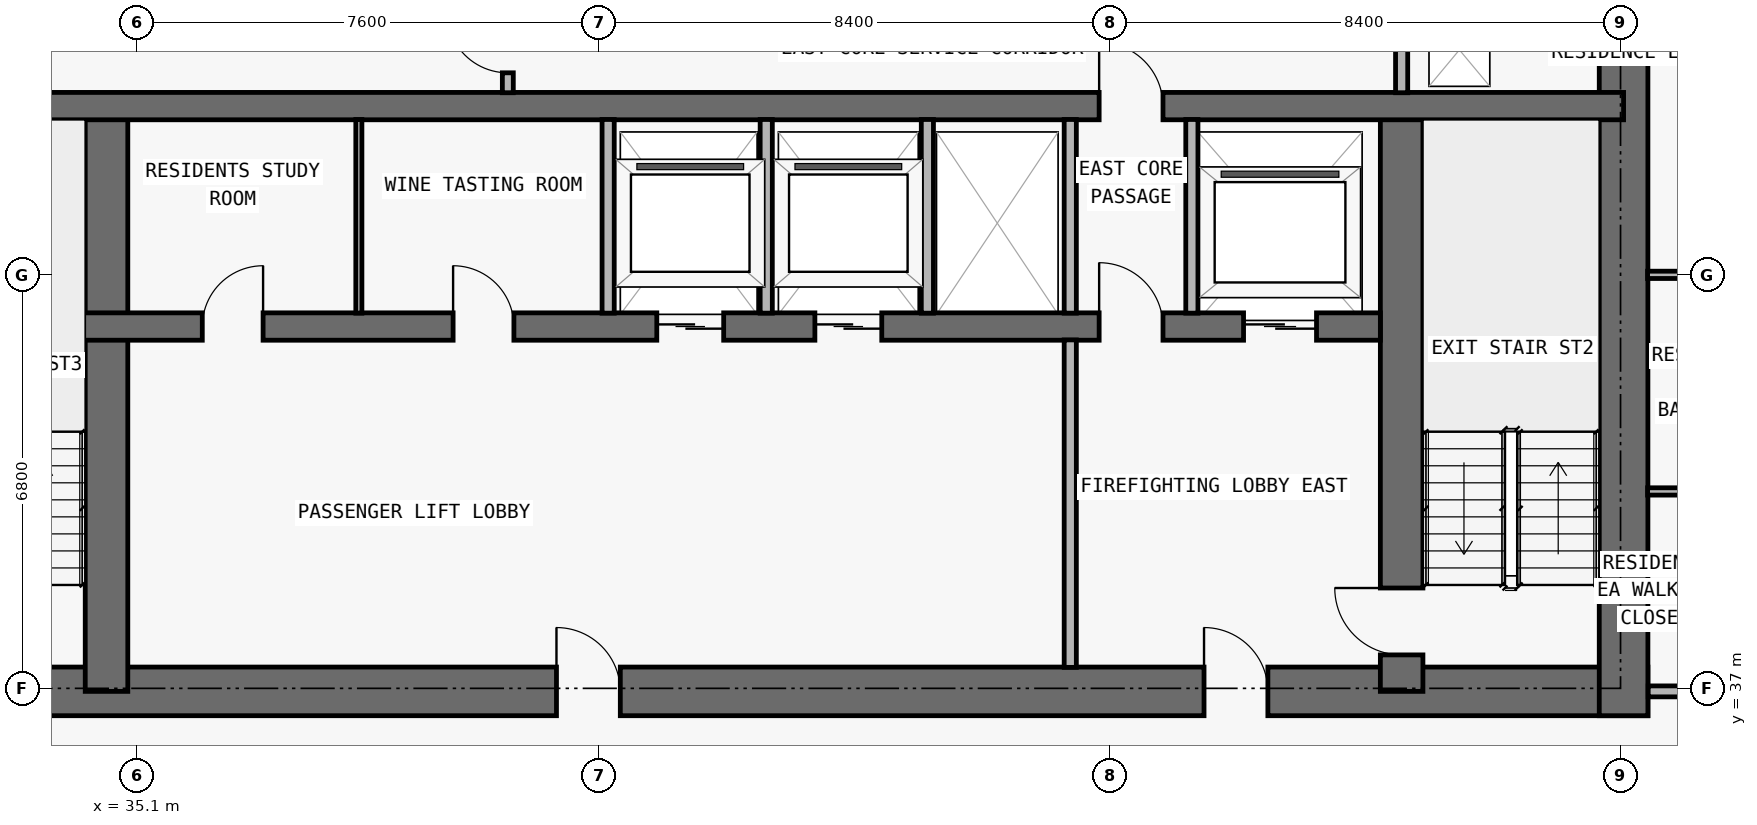
"""IFC4 building model, lengths in metres.
Left out: names, types, materials, properties, quantities, classifications, styles, units other than length and angle.
Written with IfcOpenShell. Run it as: python <this file> out.ifc"""

import sys

from ifc_helpers import new_model, si_unit, direction, frame, frame_2d, origin, place, context, subcontext, project, spatial, rectangle, extrude, element, fill, save


model = new_model("IFC4")
c1 = context("Model", 3, precision=1e-05, world=origin(), true_north=direction((0.0, 1.0)))
c2 = subcontext(c1, "Body", "Model", "MODEL_VIEW")
j1 = project(units=[si_unit("LENGTHUNIT", "METRE"), si_unit("PLANEANGLEUNIT", "RADIAN")], contexts=[c1])
p1 = place(None, origin())
s1 = spatial("IfcSite", under=j1, at=p1, CompositionType="ELEMENT")
p2 = place(p1, origin())
s2 = spatial("IfcBuilding", under=s1, at=p2, CompositionType="ELEMENT")
p3 = place(p2, frame((0.0, 0.0, 122.4)))
s3 = spatial("IfcBuildingStorey", under=s2, at=p3, CompositionType="ELEMENT", Elevation=122.4)
p4 = place(p3, frame((17.85, 36.95, 0.0), z_axis=(0.0, 0.0, 1.0), x_axis=(1.0, 0.0, 0.0)))
e1 = element("IfcWall", 1, at=p4, inside=s3, PredefinedType="SHEAR", context=c2, shape_type="SweptSolid", body=[
    extrude(rectangle(XDim=42.1, YDim=0.8, at=frame_2d((21.05, 0.0))), origin(), (0.0, 0.0, 1.0), 3.05),
])
p5 = place(p4, frame((14.45, 0.0, 0.0)))
e2 = element("IfcOpeningElement", 2, at=p5, cuts=e1, PredefinedType="OPENING", context=c2, shape_type="SweptSolid", body=[
    extrude(rectangle(XDim=1.1, YDim=2.15, at=frame_2d((0.55, 1.075))), frame((0.0, 0.41, 0.0), z_axis=(0.0, -1.0, 0.0), x_axis=(1.0, 0.0, 0.0)), (0.0, 0.0, 1.0), 0.82),
])
p6 = place(p4, frame((6.3, 0.0, 0.0)))
e3 = element("IfcOpeningElement", 3, at=p6, cuts=e1, PredefinedType="OPENING", context=c2, shape_type="SweptSolid", body=[
    extrude(rectangle(XDim=1.05, YDim=2.15, at=frame_2d((0.525, 1.075))), frame((0.0, 0.41, 0.0), z_axis=(0.0, -1.0, 0.0), x_axis=(1.0, 0.0, 0.0)), (0.0, 0.0, 1.0), 0.82),
])
p7 = place(p4, frame((34.8, 0.0, 0.0)))
e4 = element("IfcOpeningElement", 4, at=p7, cuts=e1, PredefinedType="OPENING", context=c2, shape_type="SweptSolid", body=[
    extrude(rectangle(XDim=1.05, YDim=2.15, at=frame_2d((0.525, 1.075))), frame((0.0, 0.41, 0.0), z_axis=(0.0, -1.0, 0.0), x_axis=(1.0, 0.0, 0.0)), (0.0, 0.0, 1.0), 0.82),
])
p8 = place(p4, frame((10.913, 0.0, 0.0)))
e5 = element("IfcOpeningElement", 5, at=p8, cuts=e1, PredefinedType="OPENING", context=c2, shape_type="SweptSolid", body=[
    extrude(rectangle(XDim=1.05, YDim=2.15, at=frame_2d((0.525, 1.075))), frame((0.0, 0.41, 0.0), z_axis=(0.0, -1.0, 0.0), x_axis=(1.0, 0.0, 0.0)), (0.0, 0.0, 1.0), 0.82),
])
p9 = place(p4, frame((24.15, 0.0, 0.0)))
e6 = element("IfcOpeningElement", 6, at=p9, cuts=e1, PredefinedType="OPENING", context=c2, shape_type="SweptSolid", body=[
    extrude(rectangle(XDim=1.05, YDim=2.15, at=frame_2d((0.525, 1.075))), frame((0.0, 0.41, 0.0), z_axis=(0.0, -1.0, 0.0), x_axis=(1.0, 0.0, 0.0)), (0.0, 0.0, 1.0), 0.82),
])
p10 = place(p3, frame((59.55, 36.55, 0.0), z_axis=(0.0, 0.0, 1.0), x_axis=(0.0, 1.0, 0.0)))
e7 = element("IfcWall", 7, at=p10, inside=s3, PredefinedType="SHEAR", context=c2, shape_type="SweptSolid", body=[
    extrude(rectangle(XDim=14.05, YDim=0.8, at=frame_2d((7.025, 0.0))), origin(), (0.0, 0.0, 1.0), 3.05),
])
p11 = place(p3, frame((55.9, 36.95, 0.0), z_axis=(0.0, 0.0, 1.0), x_axis=(0.0, 1.0, 0.0)))
e8 = element("IfcWall", 8, at=p11, inside=s3, PredefinedType="SHEAR", context=c2, shape_type="SweptSolid", body=[
    extrude(rectangle(XDim=9.625, YDim=0.7, at=frame_2d((4.812, 0.0))), origin(), (0.0, 0.0, 1.0), 3.05),
])
p12 = place(p11, frame((0.6, 0.0, 0.0)))
e9 = element("IfcOpeningElement", 9, at=p12, cuts=e8, PredefinedType="OPENING", context=c2, shape_type="SweptSolid", body=[
    extrude(rectangle(XDim=1.1, YDim=2.15, at=frame_2d((0.55, 1.075))), frame((0.0, 0.36, 0.0), z_axis=(0.0, -1.0, 0.0), x_axis=(1.0, 0.0, 0.0)), (0.0, 0.0, 1.0), 0.72),
])
p13 = place(p3, frame((34.6, 36.95, 0.0), z_axis=(0.0, 0.0, 1.0), x_axis=(0.0, 1.0, 0.0)))
e10 = element("IfcWall", 10, at=p13, inside=s3, PredefinedType="SHEAR", context=c2, shape_type="SweptSolid", body=[
    extrude(rectangle(XDim=9.625, YDim=0.7, at=frame_2d((4.812, 0.0))), origin(), (0.0, 0.0, 1.0), 3.05),
])
p14 = place(p3, frame((22.25, 42.95, 0.0), z_axis=(0.0, 0.0, 1.0), x_axis=(1.0, 0.0, 0.0)))
e11 = element("IfcWall", 11, at=p14, inside=s3, PredefinedType="SHEAR", context=c2, shape_type="SweptSolid", body=[
    extrude(rectangle(XDim=33.3, YDim=0.45, at=frame_2d((16.65, 0.0))), origin(), (0.0, 0.0, 1.0), 3.05),
])
p15 = place(p14, frame((1.05, 0.0, 0.0)))
e12 = element("IfcOpeningElement", 12, at=p15, cuts=e11, PredefinedType="OPENING", context=c2, shape_type="SweptSolid", body=[
    extrude(rectangle(XDim=1.2, YDim=2.2, at=frame_2d((0.6, 1.1))), frame((0.0, 0.235, 0.0), z_axis=(0.0, -1.0, 0.0), x_axis=(1.0, 0.0, 0.0)), (0.0, 0.0, 1.0), 0.47),
])
p16 = place(p14, frame((31.05, 0.0, 0.0)))
e13 = element("IfcOpeningElement", 13, at=p16, cuts=e11, PredefinedType="OPENING", context=c2, shape_type="SweptSolid", body=[
    extrude(rectangle(XDim=1.2, YDim=2.2, at=frame_2d((0.6, 1.1))), frame((0.0, 0.235, 0.0), z_axis=(0.0, -1.0, 0.0), x_axis=(1.0, 0.0, 0.0)), (0.0, 0.0, 1.0), 0.47),
])
p17 = place(p14, frame((21.4, 0.0, 0.0)))
e14 = element("IfcOpeningElement", 14, at=p17, cuts=e11, PredefinedType="OPENING", context=c2, shape_type="SweptSolid", body=[
    extrude(rectangle(XDim=1.1, YDim=2.2, at=frame_2d((0.55, 1.1))), frame((0.0, 0.235, 0.0), z_axis=(0.0, -1.0, 0.0), x_axis=(1.0, 0.0, 0.0)), (0.0, 0.0, 1.0), 0.47),
])
p18 = place(p14, frame((24.0, 0.0, 0.0)))
e15 = element("IfcOpeningElement", 15, at=p18, cuts=e11, PredefinedType="OPENING", context=c2, shape_type="SweptSolid", body=[
    extrude(rectangle(XDim=1.1, YDim=2.2, at=frame_2d((0.55, 1.1))), frame((0.0, 0.235, 0.0), z_axis=(0.0, -1.0, 0.0), x_axis=(1.0, 0.0, 0.0)), (0.0, 0.0, 1.0), 0.47),
])
p19 = place(p14, frame((3.625, 0.0, 0.0)))
e16 = element("IfcOpeningElement", 16, at=p19, cuts=e11, PredefinedType="OPENING", context=c2, shape_type="SweptSolid", body=[
    extrude(rectangle(XDim=1.05, YDim=2.15, at=frame_2d((0.525, 1.075))), frame((0.0, 0.235, 0.0), z_axis=(0.0, -1.0, 0.0), x_axis=(1.0, 0.0, 0.0)), (0.0, 0.0, 1.0), 0.47),
])
p20 = place(p14, frame((28.675, 0.0, 0.0)))
e17 = element("IfcOpeningElement", 17, at=p20, cuts=e11, PredefinedType="OPENING", context=c2, shape_type="SweptSolid", body=[
    extrude(rectangle(XDim=1.05, YDim=2.15, at=frame_2d((0.525, 1.075))), frame((0.0, 0.235, 0.0), z_axis=(0.0, -1.0, 0.0), x_axis=(1.0, 0.0, 0.0)), (0.0, 0.0, 1.0), 0.47),
])
p21 = place(p14, frame((13.925, 0.0, 0.0)))
e18 = element("IfcOpeningElement", 18, at=p21, cuts=e11, PredefinedType="OPENING", context=c2, shape_type="SweptSolid", body=[
    extrude(rectangle(XDim=1.0, YDim=2.2, at=frame_2d((0.5, 1.1))), frame((0.0, 0.235, 0.0), z_axis=(0.0, -1.0, 0.0), x_axis=(1.0, 0.0, 0.0)), (0.0, 0.0, 1.0), 0.47),
])
p22 = place(p14, frame((18.05, 0.0, 0.0)))
e19 = element("IfcOpeningElement", 19, at=p22, cuts=e11, PredefinedType="OPENING", context=c2, shape_type="SweptSolid", body=[
    extrude(rectangle(XDim=1.0, YDim=2.2, at=frame_2d((0.5, 1.1))), frame((0.0, 0.235, 0.0), z_axis=(0.0, -1.0, 0.0), x_axis=(1.0, 0.0, 0.0)), (0.0, 0.0, 1.0), 0.47),
])
p23 = place(p3, frame((18.25, 46.575, 0.0), z_axis=(0.0, 0.0, 1.0), x_axis=(1.0, 0.0, 0.0)))
e20 = element("IfcWall", 20, at=p23, inside=s3, PredefinedType="SHEAR", context=c2, shape_type="SweptSolid", body=[
    extrude(rectangle(XDim=41.3, YDim=0.45, at=frame_2d((20.65, 0.0))), origin(), (0.0, 0.0, 1.0), 3.05),
])
p24 = place(p23, frame((7.65, 0.0, 0.0)))
e21 = element("IfcOpeningElement", 21, at=p24, cuts=e20, PredefinedType="OPENING", context=c2, shape_type="SweptSolid", body=[
    extrude(rectangle(XDim=1.0, YDim=2.2, at=frame_2d((0.5, 1.1))), frame((0.0, 0.235, 0.0), z_axis=(0.0, -1.0, 0.0), x_axis=(1.0, 0.0, 0.0)), (0.0, 0.0, 1.0), 0.47),
])
p25 = place(p23, frame((32.675, 0.0, 0.0)))
e22 = element("IfcOpeningElement", 22, at=p25, cuts=e20, PredefinedType="OPENING", context=c2, shape_type="SweptSolid", body=[
    extrude(rectangle(XDim=1.05, YDim=2.15, at=frame_2d((0.525, 1.075))), frame((0.0, 0.235, 0.0), z_axis=(0.0, -1.0, 0.0), x_axis=(1.0, 0.0, 0.0)), (0.0, 0.0, 1.0), 0.47),
])
p26 = place(p3, frame((38.75, 43.17, 0.0), z_axis=(0.0, 0.0, 1.0), x_axis=(0.0, 1.0, 0.0)))
e23 = element("IfcWall", 23, at=p26, inside=s3, PredefinedType="MOVABLE", context=c2, shape_type="SweptSolid", body=[
    extrude(rectangle(XDim=3.185, YDim=0.1, at=frame_2d((1.593, 0.0))), origin(), (0.0, 0.0, 1.0), 3.05),
])
p27 = place(p3, frame((41.2, 46.795, 0.0), z_axis=(0.0, 0.0, 1.0), x_axis=(0.0, 1.0, 0.0)))
e24 = element("IfcWall", 24, at=p27, inside=s3, PredefinedType="PARTITIONING", context=c2, shape_type="SweptSolid", body=[
    extrude(rectangle(XDim=3.16, YDim=0.18, at=frame_2d((1.58, 0.0))), origin(), (0.0, 0.0, 1.0), 3.05),
])
p28 = place(p27, frame((0.327, 0.0, 0.0)))
e25 = element("IfcOpeningElement", 25, at=p28, cuts=e24, PredefinedType="OPENING", context=c2, shape_type="SweptSolid", body=[
    extrude(rectangle(XDim=1.0, YDim=2.2, at=frame_2d((0.5, 1.1))), frame((0.0, 0.1, 0.0), z_axis=(0.0, -1.0, 0.0), x_axis=(1.0, 0.0, 0.0)), (0.0, 0.0, 1.0), 0.2),
])
for number, where, z_axis, x_axis in (
    (26, (42.85, 43.17, 0.0), (0.0, 0.0, 1.0), (0.0, 1.0, 0.0)),
    (27, (45.45, 43.17, 0.0), (0.0, 0.0, 1.0), (0.0, 1.0, 0.0)),
    (28, (48.1, 43.17, 0.0), (0.0, 0.0, 1.0), (0.0, 1.0, 0.0)),
):
    element("IfcWall", number, at=place(p3, frame(where, z_axis=z_axis, x_axis=x_axis)), inside=s3, PredefinedType="PARTITIONING", context=c2, shape_type="SweptSolid", body=[
        extrude(rectangle(XDim=3.185, YDim=0.2, at=frame_2d((1.593, 0.0))), origin(), (0.0, 0.0, 1.0), 3.05),
    ])
p29 = place(p3, frame((50.45, 37.345, 0.0), z_axis=(0.0, 0.0, 1.0), x_axis=(0.0, 1.0, 0.0)))
e29 = element("IfcWall", 29, at=p29, inside=s3, PredefinedType="PARTITIONING", context=c2, shape_type="SweptSolid", body=[
    extrude(rectangle(XDim=5.385, YDim=0.2, at=frame_2d((2.692, 0.0))), origin(), (0.0, 0.0, 1.0), 3.05),
])
for number, where, z_axis, x_axis in (
    (30, (50.45, 43.17, 0.0), (0.0, 0.0, 1.0), (0.0, 1.0, 0.0)),
    (31, (52.45, 43.17, 0.0), (0.0, 0.0, 1.0), (0.0, 1.0, 0.0)),
):
    element("IfcWall", number, at=place(p3, frame(where, z_axis=z_axis, x_axis=x_axis)), inside=s3, PredefinedType="PARTITIONING", context=c2, shape_type="SweptSolid", body=[
        extrude(rectangle(XDim=3.185, YDim=0.2, at=frame_2d((1.593, 0.0))), origin(), (0.0, 0.0, 1.0), 3.05),
    ])
p30 = place(p3, frame((55.9, 46.795, 0.0), z_axis=(0.0, 0.0, 1.0), x_axis=(0.0, 1.0, 0.0)))
e32 = element("IfcWall", 32, at=p30, inside=s3, PredefinedType="PARTITIONING", context=c2, shape_type="SweptSolid", body=[
    extrude(rectangle(XDim=3.16, YDim=0.2, at=frame_2d((1.58, 0.0))), origin(), (0.0, 0.0, 1.0), 3.05),
])
p31 = place(p3, frame((59.955, 36.95, 0.0), z_axis=(0.0, 0.0, 1.0), x_axis=(1.0, 0.0, 0.0)))
e33 = element("IfcWall", 33, at=p31, inside=s3, PredefinedType="PARTITIONING", context=c2, shape_type="SweptSolid", body=[
    extrude(rectangle(XDim=10.145, YDim=0.18, at=frame_2d((5.073, 0.0))), origin(), (0.0, 0.0, 1.0), 3.05),
])
p32 = place(p31, frame((3.957, 0.0, 0.0)))
e34 = element("IfcOpeningElement", 34, at=p32, cuts=e33, PredefinedType="OPENING", context=c2, shape_type="SweptSolid", body=[
    extrude(rectangle(XDim=1.0, YDim=2.2, at=frame_2d((0.5, 1.1))), frame((0.0, 0.1, 0.0), z_axis=(0.0, -1.0, 0.0), x_axis=(1.0, 0.0, 0.0)), (0.0, 0.0, 1.0), 0.2),
])
p33 = place(p3, frame((59.945, 40.238, 0.0), z_axis=(0.0, 0.0, 1.0), x_axis=(1.0, 0.0, 0.0)))
e35 = element("IfcWall", 35, at=p33, inside=s3, PredefinedType="PARTITIONING", context=c2, shape_type="SweptSolid", body=[
    extrude(rectangle(XDim=2.255, YDim=0.12, at=frame_2d((1.127, 0.0))), origin(), (0.0, 0.0, 1.0), 3.05),
])
p34 = place(p3, frame((59.945, 43.8, 0.0), z_axis=(0.0, 0.0, 1.0), x_axis=(1.0, 0.0, 0.0)))
e36 = element("IfcWall", 36, at=p34, inside=s3, PredefinedType="PARTITIONING", context=c2, shape_type="SweptSolid", body=[
    extrude(rectangle(XDim=13.66, YDim=0.12, at=frame_2d((6.83, 0.0))), origin(), (0.0, 0.0, 1.0), 2.339),
])
p35 = place(p34, frame((4.017, 0.0, 0.0)))
e37 = element("IfcOpeningElement", 37, at=p35, cuts=e36, PredefinedType="OPENING", context=c2, shape_type="SweptSolid", body=[
    extrude(rectangle(XDim=0.9, YDim=2.15, at=frame_2d((0.45, 1.075))), frame((0.0, 0.07, 0.0), z_axis=(0.0, -1.0, 0.0), x_axis=(1.0, 0.0, 0.0)), (0.0, 0.0, 1.0), 0.14),
])
p36 = place(p34, frame((0.702, 0.0, 0.0)))
e38 = element("IfcOpeningElement", 38, at=p36, cuts=e36, PredefinedType="OPENING", context=c2, shape_type="SweptSolid", body=[
    extrude(rectangle(XDim=0.85, YDim=2.1, at=frame_2d((0.425, 1.05))), frame((0.0, 0.07, 0.0), z_axis=(0.0, -1.0, 0.0), x_axis=(1.0, 0.0, 0.0)), (0.0, 0.0, 1.0), 0.14),
])
p37 = place(p16, origin())
e39 = element("IfcDoor", 39, at=p37, inside=s3, OperationType="DOUBLE_DOOR_SLIDING", PredefinedType="DOOR", context=c2, shape_type="SweptSolid", body=[
    extrude(rectangle(XDim=1.2, YDim=2.2, at=frame_2d((0.6, 1.1))), frame((0.0, 0.025, 0.0), z_axis=(0.0, -1.0, 0.0), x_axis=(1.0, 0.0, 0.0)), (0.0, 0.0, 1.0), 0.05),
])
fill(e13, e39)
p38 = place(p17, origin())
e40 = element("IfcDoor", 40, at=p38, inside=s3, OperationType="DOUBLE_DOOR_SLIDING", PredefinedType="DOOR", context=c2, shape_type="SweptSolid", body=[
    extrude(rectangle(XDim=1.1, YDim=2.2, at=frame_2d((0.55, 1.1))), frame((0.0, 0.025, 0.0), z_axis=(0.0, -1.0, 0.0), x_axis=(1.0, 0.0, 0.0)), (0.0, 0.0, 1.0), 0.05),
])
fill(e14, e40)
p39 = place(p18, origin())
e41 = element("IfcDoor", 41, at=p39, inside=s3, OperationType="DOUBLE_DOOR_SLIDING", PredefinedType="DOOR", context=c2, shape_type="SweptSolid", body=[
    extrude(rectangle(XDim=1.1, YDim=2.2, at=frame_2d((0.55, 1.1))), frame((0.0, 0.025, 0.0), z_axis=(0.0, -1.0, 0.0), x_axis=(1.0, 0.0, 0.0)), (0.0, 0.0, 1.0), 0.05),
])
fill(e15, e41)
p40 = place(p7, origin())
e42 = element("IfcDoor", 42, at=p40, inside=s3, OperationType="SINGLE_SWING_LEFT", PredefinedType="DOOR", context=c2, shape_type="SweptSolid", body=[
    extrude(rectangle(XDim=1.05, YDim=2.15, at=frame_2d((0.525, 1.075))), frame((0.0, 0.025, 0.0), z_axis=(0.0, -1.0, 0.0), x_axis=(1.0, 0.0, 0.0)), (0.0, 0.0, 1.0), 0.05),
])
fill(e4, e42)
p41 = place(p12, origin())
e43 = element("IfcDoor", 43, at=p41, inside=s3, OperationType="SINGLE_SWING_RIGHT", PredefinedType="DOOR", context=c2, shape_type="SweptSolid", body=[
    extrude(rectangle(XDim=1.1, YDim=2.15, at=frame_2d((0.55, 1.075))), frame((0.0, 0.025, 0.0), z_axis=(0.0, -1.0, 0.0), x_axis=(1.0, 0.0, 0.0)), (0.0, 0.0, 1.0), 0.05),
])
fill(e9, e43)
p42 = place(p20, origin())
e44 = element("IfcDoor", 44, at=p42, inside=s3, OperationType="SINGLE_SWING_LEFT", PredefinedType="DOOR", context=c2, shape_type="SweptSolid", body=[
    extrude(rectangle(XDim=1.05, YDim=2.15, at=frame_2d((0.525, 1.075))), frame((0.0, 0.025, 0.0), z_axis=(0.0, -1.0, 0.0), x_axis=(1.0, 0.0, 0.0)), (0.0, 0.0, 1.0), 0.05),
])
fill(e17, e44)
p43 = place(p9, origin())
e45 = element("IfcDoor", 45, at=p43, inside=s3, OperationType="SINGLE_SWING_LEFT", PredefinedType="DOOR", context=c2, shape_type="SweptSolid", body=[
    extrude(rectangle(XDim=1.05, YDim=2.15, at=frame_2d((0.525, 1.075))), frame((0.0, 0.025, 0.0), z_axis=(0.0, -1.0, 0.0), x_axis=(1.0, 0.0, 0.0)), (0.0, 0.0, 1.0), 0.05),
])
fill(e6, e45)
p44 = place(p21, origin())
e46 = element("IfcDoor", 46, at=p44, inside=s3, OperationType="SINGLE_SWING_RIGHT", PredefinedType="DOOR", context=c2, shape_type="SweptSolid", body=[
    extrude(rectangle(XDim=1.0, YDim=2.2, at=frame_2d((0.5, 1.1))), frame((0.0, 0.025, 0.0), z_axis=(0.0, -1.0, 0.0), x_axis=(1.0, 0.0, 0.0)), (0.0, 0.0, 1.0), 0.05),
])
fill(e18, e46)
p45 = place(p22, origin())
e47 = element("IfcDoor", 47, at=p45, inside=s3, OperationType="SINGLE_SWING_LEFT", PredefinedType="DOOR", context=c2, shape_type="SweptSolid", body=[
    extrude(rectangle(XDim=1.0, YDim=2.2, at=frame_2d((0.5, 1.1))), frame((0.0, 0.025, 0.0), z_axis=(0.0, -1.0, 0.0), x_axis=(1.0, 0.0, 0.0)), (0.0, 0.0, 1.0), 0.05),
])
fill(e19, e47)
p46 = place(p25, origin())
e48 = element("IfcDoor", 48, at=p46, inside=s3, OperationType="SINGLE_SWING_LEFT", PredefinedType="DOOR", context=c2, shape_type="SweptSolid", body=[
    extrude(rectangle(XDim=1.05, YDim=2.15, at=frame_2d((0.525, 1.075))), frame((0.0, 0.025, 0.0), z_axis=(0.0, -1.0, 0.0), x_axis=(1.0, 0.0, 0.0)), (0.0, 0.0, 1.0), 0.05),
])
fill(e22, e48)
p47 = place(p28, origin())
e49 = element("IfcDoor", 49, at=p47, inside=s3, OperationType="SINGLE_SWING_RIGHT", PredefinedType="DOOR", context=c2, shape_type="SweptSolid", body=[
    extrude(rectangle(XDim=1.0, YDim=2.2, at=frame_2d((0.5, 1.1))), frame((0.0, 0.025, 0.0), z_axis=(0.0, -1.0, 0.0), x_axis=(1.0, 0.0, 0.0)), (0.0, 0.0, 1.0), 0.05),
])
fill(e25, e49)
save(model, sys.argv[1])
